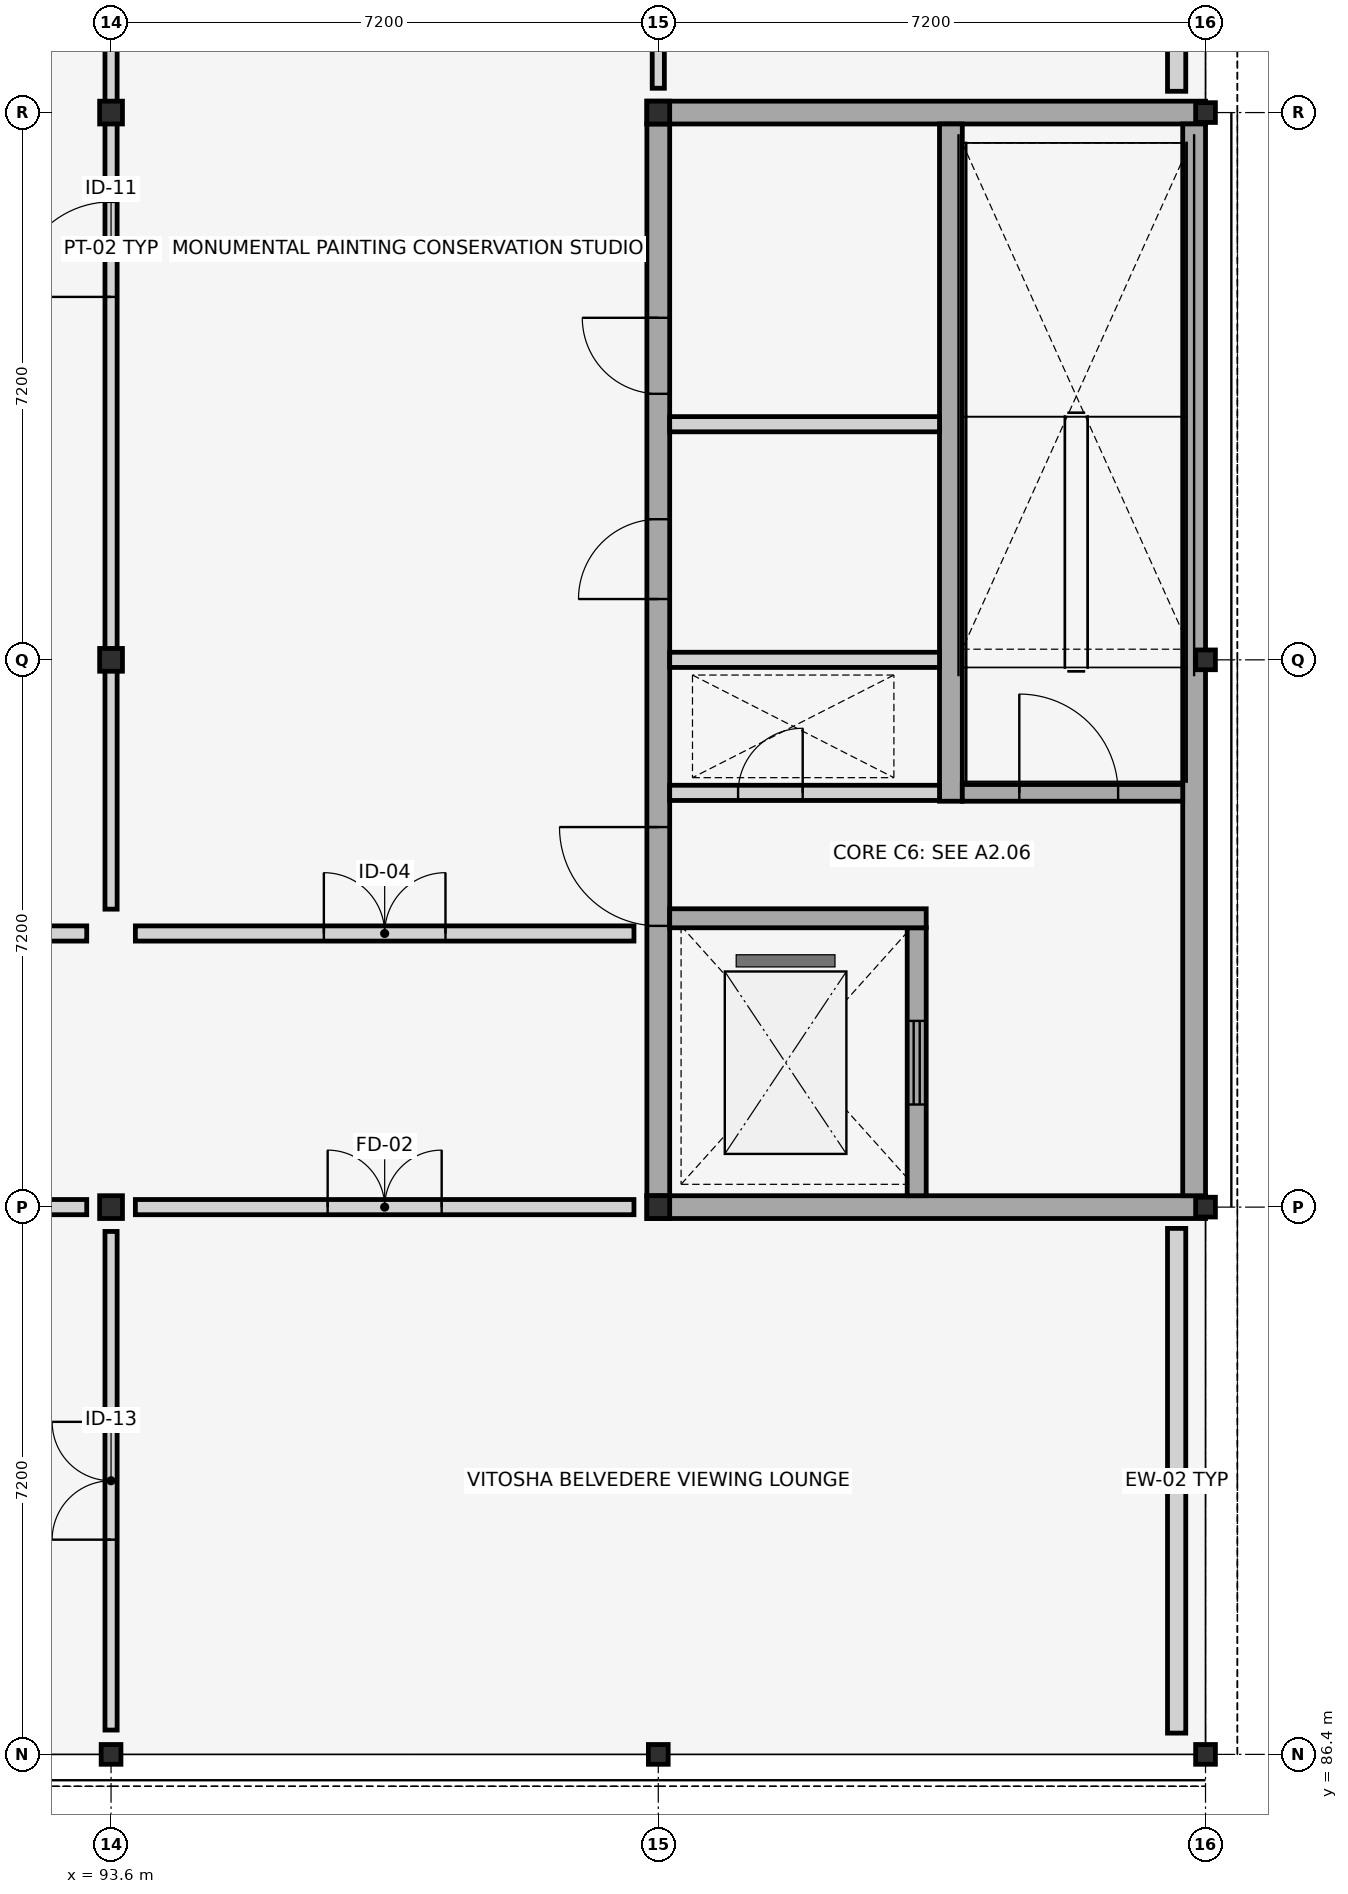
"""IFC4 building model, lengths in metres.
Left out: names, types, materials, properties, quantities, classifications, styles, units other than length and angle.
Written with IfcOpenShell. Run it as: python <this file> out.ifc"""

import sys

from ifc_helpers import new_model, si_unit, direction, frame, frame_2d, origin, origin_2d, place, context, subcontext, project, spatial, rectangle, i_section, extrude, element, fill, save


model = new_model("IFC4")
c1 = context("Model", 3, precision=1e-05, world=origin(), true_north=direction((0.0, 1.0)))
c2 = subcontext(c1, "Body", "Model", "MODEL_VIEW")
j1 = project(units=[si_unit("LENGTHUNIT", "METRE"), si_unit("PLANEANGLEUNIT", "RADIAN")], contexts=[c1])
p1 = place(None, origin())
s1 = spatial("IfcSite", under=j1, at=p1, CompositionType="ELEMENT")
p2 = place(p1, origin())
s2 = spatial("IfcBuilding", under=s1, at=p2, CompositionType="ELEMENT")
p3 = place(p2, frame((0.0, 0.0, 17.1)))
s3 = spatial("IfcBuildingStorey", under=s2, at=p3, CompositionType="ELEMENT", Elevation=17.1)
p4 = place(p3, frame((93.6, 86.4, 0.0), z_axis=(0.0, 0.0, 1.0), x_axis=(0.0, 1.0, 0.0)))
e1 = element("IfcColumn", 1, at=p4, inside=s3, PredefinedType="COLUMN", context=c2, shape_type="SweptSolid", body=[
    extrude(i_section(OverallWidth=0.26, OverallDepth=0.26, WebThickness=0.01, FlangeThickness=0.018, FilletRadius=0.024, at=origin_2d()), origin(), (0.0, 0.0, 1.0), 8.1),
])
for number, where, z_axis, x_axis in (
    (2, (93.6, 93.6, 0.0), (0.0, 0.0, 1.0), (1.0, 0.0, 0.0)),
    (3, (93.6, 100.8, 0.0), (0.0, 0.0, 1.0), (0.0, 1.0, 0.0)),
    (4, (93.6, 108.0, 0.0), (0.0, 0.0, 1.0), (1.0, 0.0, 0.0)),
):
    element("IfcColumn", number, at=place(p3, frame(where, z_axis=z_axis, x_axis=x_axis)), inside=s3, PredefinedType="COLUMN", context=c2, shape_type="SweptSolid", body=[
        extrude(i_section(OverallWidth=0.3, OverallDepth=0.3, WebThickness=0.011, FlangeThickness=0.019, FilletRadius=0.027, at=origin_2d()), origin(), (0.0, 0.0, 1.0), 8.1),
    ])
p5 = place(p3, frame((100.8, 86.4, 0.0), z_axis=(0.0, 0.0, 1.0), x_axis=(1.0, 0.0, 0.0)))
e5 = element("IfcColumn", 5, at=p5, inside=s3, PredefinedType="COLUMN", context=c2, shape_type="SweptSolid", body=[
    extrude(i_section(OverallWidth=0.26, OverallDepth=0.26, WebThickness=0.01, FlangeThickness=0.018, FilletRadius=0.024, at=origin_2d()), origin(), (0.0, 0.0, 1.0), 8.1),
])
for number, where, z_axis, x_axis in (
    (6, (100.8, 93.6, 0.0), (0.0, 0.0, 1.0), (0.0, 1.0, 0.0)),
    (7, (100.8, 108.0, 0.0), (0.0, 0.0, 1.0), (0.0, 1.0, 0.0)),
):
    element("IfcColumn", number, at=place(p3, frame(where, z_axis=z_axis, x_axis=x_axis)), inside=s3, PredefinedType="COLUMN", context=c2, shape_type="SweptSolid", body=[
        extrude(i_section(OverallWidth=0.3, OverallDepth=0.3, WebThickness=0.011, FlangeThickness=0.019, FilletRadius=0.027, at=origin_2d()), origin(), (0.0, 0.0, 1.0), 8.1),
    ])
for number, where, z_axis, x_axis in (
    (8, (108.0, 86.4, 0.0), (0.0, 0.0, 1.0), (0.0, 1.0, 0.0)),
    (9, (108.0, 93.6, 0.0), (0.0, 0.0, 1.0), (1.0, 0.0, 0.0)),
    (10, (108.0, 100.8, 0.0), (0.0, 0.0, 1.0), (0.0, 1.0, 0.0)),
    (11, (108.0, 108.0, 0.0), (0.0, 0.0, 1.0), (1.0, 0.0, 0.0)),
):
    element("IfcColumn", number, at=place(p3, frame(where, z_axis=z_axis, x_axis=x_axis)), inside=s3, PredefinedType="COLUMN", context=c2, shape_type="SweptSolid", body=[
        extrude(i_section(OverallWidth=0.26, OverallDepth=0.26, WebThickness=0.01, FlangeThickness=0.018, FilletRadius=0.024, at=origin_2d()), origin(), (0.0, 0.0, 1.0), 8.1),
    ])
p6 = place(p3, frame((107.62, 86.68, 0.0), z_axis=(0.0, 0.0, 1.0), x_axis=(0.0, 1.0, 0.0)))
e12 = element("IfcWall", 12, at=p6, inside=s3, PredefinedType="STANDARD", context=c2, shape_type="SweptSolid", body=[
    extrude(rectangle(XDim=6.64, YDim=0.24, at=frame_2d((3.32, 0.0))), origin(), (0.0, 0.0, 1.0), 7.48),
])
p7 = place(p3, frame((107.62, 108.28, 0.0), z_axis=(0.0, 0.0, 1.0), x_axis=(0.0, 1.0, 0.0)))
e13 = element("IfcWall", 13, at=p7, inside=s3, PredefinedType="STANDARD", context=c2, shape_type="SweptSolid", body=[
    extrude(rectangle(XDim=6.64, YDim=0.24, at=frame_2d((3.32, 0.0))), origin(), (0.0, 0.0, 1.0), 7.48),
])
for number, where, z_axis, x_axis in (
    (14, (100.65, 93.6, 0.0), (0.0, 0.0, 1.0), (1.0, 0.0, 0.0)),
    (15, (100.65, 108.0, 0.0), (0.0, 0.0, 1.0), (1.0, 0.0, 0.0)),
):
    element("IfcWall", number, at=place(p3, frame(where, z_axis=z_axis, x_axis=x_axis)), inside=s3, PredefinedType="SHEAR", context=c2, shape_type="SweptSolid", body=[
        extrude(rectangle(XDim=7.35, YDim=0.3, at=frame_2d((3.675, 0.0))), origin(), (0.0, 0.0, 1.0), 7.88),
    ])
p8 = place(p3, frame((107.85, 93.75, 0.0), z_axis=(0.0, 0.0, 1.0), x_axis=(0.0, 1.0, 0.0)))
e16 = element("IfcWall", 16, at=p8, inside=s3, PredefinedType="SHEAR", context=c2, shape_type="SweptSolid", body=[
    extrude(rectangle(XDim=14.1, YDim=0.3, at=frame_2d((7.05, 0.0))), origin(), (0.0, 0.0, 1.0), 7.88),
])
p9 = place(p3, frame((100.8, 93.75, 0.0), z_axis=(0.0, 0.0, 1.0), x_axis=(0.0, 1.0, 0.0)))
e17 = element("IfcWall", 17, at=p9, inside=s3, PredefinedType="SHEAR", context=c2, shape_type="SweptSolid", body=[
    extrude(rectangle(XDim=14.1, YDim=0.3, at=frame_2d((7.05, 0.0))), origin(), (0.0, 0.0, 1.0), 7.88),
])
p10 = place(p9, frame((3.55, 0.0, 0.0)))
e18 = element("IfcOpeningElement", 18, at=p10, cuts=e17, PredefinedType="OPENING", context=c2, shape_type="SweptSolid", body=[
    extrude(rectangle(XDim=1.3, YDim=2.2, at=frame_2d((0.65, 1.1))), frame((0.0, 0.16, 0.0), z_axis=(0.0, -1.0, 0.0), x_axis=(1.0, 0.0, 0.0)), (0.0, 0.0, 1.0), 0.32),
])
p11 = place(p9, frame((7.85, 0.0, 0.0)))
e19 = element("IfcOpeningElement", 19, at=p11, cuts=e17, PredefinedType="OPENING", context=c2, shape_type="SweptSolid", body=[
    extrude(rectangle(XDim=1.05, YDim=2.15, at=frame_2d((0.525, 1.075))), frame((0.0, 0.16, 0.0), z_axis=(0.0, -1.0, 0.0), x_axis=(1.0, 0.0, 0.0)), (0.0, 0.0, 1.0), 0.32),
])
p12 = place(p9, frame((10.55, 0.0, 0.0)))
e20 = element("IfcOpeningElement", 20, at=p12, cuts=e17, PredefinedType="OPENING", context=c2, shape_type="SweptSolid", body=[
    extrude(rectangle(XDim=1.0, YDim=2.15, at=frame_2d((0.5, 1.075))), frame((0.0, 0.16, 0.0), z_axis=(0.0, -1.0, 0.0), x_axis=(1.0, 0.0, 0.0)), (0.0, 0.0, 1.0), 0.32),
])
p13 = place(p3, frame((104.2, 93.75, 0.0), z_axis=(0.0, 0.0, 1.0), x_axis=(0.0, 1.0, 0.0)))
e21 = element("IfcWall", 21, at=p13, inside=s3, PredefinedType="SHEAR", context=c2, shape_type="SweptSolid", body=[
    extrude(rectangle(XDim=3.525, YDim=0.25, at=frame_2d((1.762, 0.0))), origin(), (0.0, 0.0, 1.0), 7.88),
])
p14 = place(p13, frame((1.2, 0.0, 0.0)))
e22 = element("IfcOpeningElement", 22, at=p14, cuts=e21, PredefinedType="OPENING", context=c2, shape_type="SweptSolid", body=[
    extrude(rectangle(XDim=1.1, YDim=2.15, at=frame_2d((0.55, 1.075))), frame((0.0, 0.135, 0.0), z_axis=(0.0, -1.0, 0.0), x_axis=(1.0, 0.0, 0.0)), (0.0, 0.0, 1.0), 0.27),
])
p15 = place(p3, frame((104.65, 98.94, 0.0), z_axis=(0.0, 0.0, 1.0), x_axis=(0.0, 1.0, 0.0)))
e23 = element("IfcWall", 23, at=p15, inside=s3, PredefinedType="SHEAR", context=c2, shape_type="SweptSolid", body=[
    extrude(rectangle(XDim=8.91, YDim=0.3, at=frame_2d((4.455, 0.0))), origin(), (0.0, 0.0, 1.0), 7.88),
])
p16 = place(p3, frame((100.95, 99.05, 0.0), z_axis=(0.0, 0.0, 1.0), x_axis=(1.0, 0.0, 0.0)))
e24 = element("IfcWall", 24, at=p16, inside=s3, PredefinedType="PLUMBINGWALL", context=c2, shape_type="SweptSolid", body=[
    extrude(rectangle(XDim=3.55, YDim=0.2, at=frame_2d((1.775, 0.0))), origin(), (0.0, 0.0, 1.0), 7.3),
])
p17 = place(p16, frame((0.9, 0.0, 0.0)))
e25 = element("IfcOpeningElement", 25, at=p17, cuts=e24, PredefinedType="OPENING", context=c2, shape_type="SweptSolid", body=[
    extrude(rectangle(XDim=0.85, YDim=2.05, at=frame_2d((0.425, 1.025))), frame((0.0, 0.11, 0.0), z_axis=(0.0, -1.0, 0.0), x_axis=(1.0, 0.0, 0.0)), (0.0, 0.0, 1.0), 0.22),
])
p18 = place(p3, frame((104.8, 99.05, 0.0), z_axis=(0.0, 0.0, 1.0), x_axis=(1.0, 0.0, 0.0)))
e26 = element("IfcWall", 26, at=p18, inside=s3, PredefinedType="SHEAR", context=c2, shape_type="SweptSolid", body=[
    extrude(rectangle(XDim=2.9, YDim=0.22, at=frame_2d((1.45, 0.0))), origin(), (0.0, 0.0, 1.0), 7.88),
])
p19 = place(p18, frame((0.75, 0.0, 0.0)))
e27 = element("IfcOpeningElement", 27, at=p19, cuts=e26, PredefinedType="OPENING", context=c2, shape_type="SweptSolid", body=[
    extrude(rectangle(XDim=1.3, YDim=2.2, at=frame_2d((0.65, 1.1))), frame((0.0, 0.12, 0.0), z_axis=(0.0, -1.0, 0.0), x_axis=(1.0, 0.0, 0.0)), (0.0, 0.0, 1.0), 0.24),
])
p20 = place(p3, frame((100.95, 97.4, 0.0), z_axis=(0.0, 0.0, 1.0), x_axis=(1.0, 0.0, 0.0)))
e28 = element("IfcWall", 28, at=p20, inside=s3, PredefinedType="SHEAR", context=c2, shape_type="SweptSolid", body=[
    extrude(rectangle(XDim=3.375, YDim=0.25, at=frame_2d((1.688, 0.0))), origin(), (0.0, 0.0, 1.0), 7.88),
])
for number, where, z_axis, x_axis in (
    (29, (100.95, 100.8, 0.0), (0.0, 0.0, 1.0), (1.0, 0.0, 0.0)),
    (30, (100.95, 103.9, 0.0), (0.0, 0.0, 1.0), (1.0, 0.0, 0.0)),
):
    element("IfcWall", number, at=place(p3, frame(where, z_axis=z_axis, x_axis=x_axis)), inside=s3, PredefinedType="PLUMBINGWALL", context=c2, shape_type="SweptSolid", body=[
        extrude(rectangle(XDim=3.55, YDim=0.2, at=frame_2d((1.775, 0.0))), origin(), (0.0, 0.0, 1.0), 7.3),
    ])
p21 = place(p3, frame((65.12, 97.2, 0.0), z_axis=(0.0, 0.0, 1.0), x_axis=(1.0, 0.0, 0.0)))
e31 = element("IfcWall", 31, at=p21, inside=s3, PredefinedType="PARTITIONING", context=c2, shape_type="SweptSolid", body=[
    extrude(rectangle(XDim=28.16, YDim=0.2, at=frame_2d((14.08, 0.0))), origin(), (0.0, 0.0, 1.0), 7.05),
])
p22 = place(p21, frame((1.649, 0.0, 0.0)))
e32 = element("IfcOpeningElement", 32, at=p22, cuts=e31, PredefinedType="OPENING", context=c2, shape_type="SweptSolid", body=[
    extrude(rectangle(XDim=1.6, YDim=2.35, at=frame_2d((0.8, 1.175))), frame((0.0, 0.11, 0.0), z_axis=(0.0, -1.0, 0.0), x_axis=(1.0, 0.0, 0.0)), (0.0, 0.0, 1.0), 0.22),
])
p23 = place(p3, frame((65.12, 93.6, 0.0), z_axis=(0.0, 0.0, 1.0), x_axis=(1.0, 0.0, 0.0)))
e33 = element("IfcWall", 33, at=p23, inside=s3, PredefinedType="PARTITIONING", context=c2, shape_type="SweptSolid", body=[
    extrude(rectangle(XDim=28.16, YDim=0.2, at=frame_2d((14.08, 0.0))), origin(), (0.0, 0.0, 1.0), 7.05),
])
p24 = place(p23, frame((1.649, 0.0, 0.0)))
e34 = element("IfcOpeningElement", 34, at=p24, cuts=e33, PredefinedType="OPENING", context=c2, shape_type="SweptSolid", body=[
    extrude(rectangle(XDim=1.6, YDim=2.35, at=frame_2d((0.8, 1.175))), frame((0.0, 0.11, 0.0), z_axis=(0.0, -1.0, 0.0), x_axis=(1.0, 0.0, 0.0)), (0.0, 0.0, 1.0), 0.22),
])
p25 = place(p3, frame((93.92, 93.6, 0.0), z_axis=(0.0, 0.0, 1.0), x_axis=(1.0, 0.0, 0.0)))
e35 = element("IfcWall", 35, at=p25, inside=s3, PredefinedType="PARTITIONING", context=c2, shape_type="SweptSolid", body=[
    extrude(rectangle(XDim=6.56, YDim=0.2, at=frame_2d((3.28, 0.0))), origin(), (0.0, 0.0, 1.0), 7.05),
])
p26 = place(p25, frame((2.53, 0.0, 0.0)))
e36 = element("IfcOpeningElement", 36, at=p26, cuts=e35, PredefinedType="OPENING", context=c2, shape_type="SweptSolid", body=[
    extrude(rectangle(XDim=1.5, YDim=2.25, at=frame_2d((0.75, 1.125))), frame((0.0, 0.11, 0.0), z_axis=(0.0, -1.0, 0.0), x_axis=(1.0, 0.0, 0.0)), (0.0, 0.0, 1.0), 0.22),
])
p27 = place(p3, frame((93.92, 97.2, 0.0), z_axis=(0.0, 0.0, 1.0), x_axis=(1.0, 0.0, 0.0)))
e37 = element("IfcWall", 37, at=p27, inside=s3, PredefinedType="PARTITIONING", context=c2, shape_type="SweptSolid", body=[
    extrude(rectangle(XDim=6.56, YDim=0.2, at=frame_2d((3.28, 0.0))), origin(), (0.0, 0.0, 1.0), 7.05),
])
p28 = place(p27, frame((2.48, 0.0, 0.0)))
e38 = element("IfcOpeningElement", 38, at=p28, cuts=e37, PredefinedType="OPENING", context=c2, shape_type="SweptSolid", body=[
    extrude(rectangle(XDim=1.6, YDim=2.35, at=frame_2d((0.8, 1.175))), frame((0.0, 0.11, 0.0), z_axis=(0.0, -1.0, 0.0), x_axis=(1.0, 0.0, 0.0)), (0.0, 0.0, 1.0), 0.22),
])
p29 = place(p3, frame((93.6, 97.52, 0.0), z_axis=(0.0, 0.0, 1.0), x_axis=(0.0, 1.0, 0.0)))
e39 = element("IfcWall", 39, at=p29, inside=s3, PredefinedType="PARTITIONING", context=c2, shape_type="SweptSolid", body=[
    extrude(rectangle(XDim=17.36, YDim=0.16, at=frame_2d((8.68, 0.0))), origin(), (0.0, 0.0, 1.0), 7.05),
])
p30 = place(p29, frame((8.055, 0.0, 0.0)))
e40 = element("IfcOpeningElement", 40, at=p30, cuts=e39, PredefinedType="OPENING", context=c2, shape_type="SweptSolid", body=[
    extrude(rectangle(XDim=1.25, YDim=2.3, at=frame_2d((0.625, 1.15))), frame((0.0, 0.09, 0.0), z_axis=(0.0, -1.0, 0.0), x_axis=(1.0, 0.0, 0.0)), (0.0, 0.0, 1.0), 0.18),
])
p31 = place(p3, frame((93.6, 86.72, 0.0), z_axis=(0.0, 0.0, 1.0), x_axis=(0.0, 1.0, 0.0)))
e41 = element("IfcWall", 41, at=p31, inside=s3, PredefinedType="PARTITIONING", context=c2, shape_type="SweptSolid", body=[
    extrude(rectangle(XDim=6.56, YDim=0.16, at=frame_2d((3.28, 0.0))), origin(), (0.0, 0.0, 1.0), 7.05),
])
p32 = place(p31, frame((2.505, 0.0, 0.0)))
e42 = element("IfcOpeningElement", 42, at=p32, cuts=e41, PredefinedType="OPENING", context=c2, shape_type="SweptSolid", body=[
    extrude(rectangle(XDim=1.55, YDim=2.4, at=frame_2d((0.775, 1.2))), frame((0.0, 0.09, 0.0), z_axis=(0.0, -1.0, 0.0), x_axis=(1.0, 0.0, 0.0)), (0.0, 0.0, 1.0), 0.18),
])
p33 = place(p3, frame((100.8, 108.32, 0.0), z_axis=(0.0, 0.0, 1.0), x_axis=(0.0, 1.0, 0.0)))
e43 = element("IfcWall", 43, at=p33, inside=s3, PredefinedType="PARTITIONING", context=c2, shape_type="SweptSolid", body=[
    extrude(rectangle(XDim=6.56, YDim=0.16, at=frame_2d((3.28, 0.0))), origin(), (0.0, 0.0, 1.0), 7.05),
])
p34 = place(p33, frame((2.355, 0.0, 0.0)))
e44 = element("IfcOpeningElement", 44, at=p34, cuts=e43, PredefinedType="OPENING", context=c2, shape_type="SweptSolid", body=[
    extrude(rectangle(XDim=1.85, YDim=2.5, at=frame_2d((0.925, 1.25))), frame((0.0, 0.09, 0.0), z_axis=(0.0, -1.0, 0.0), x_axis=(1.0, 0.0, 0.0)), (0.0, 0.0, 1.0), 0.18),
])
p35 = place(p10, origin())
e45 = element("IfcDoor", 45, at=p35, inside=s3, OperationType="SINGLE_SWING_RIGHT", PredefinedType="DOOR", context=c2, shape_type="SweptSolid", body=[
    extrude(rectangle(XDim=1.3, YDim=2.2, at=frame_2d((0.65, 1.1))), frame((0.0, 0.025, 0.0), z_axis=(0.0, -1.0, 0.0), x_axis=(1.0, 0.0, 0.0)), (0.0, 0.0, 1.0), 0.05),
])
fill(e18, e45)
p36 = place(p11, origin())
e46 = element("IfcDoor", 46, at=p36, inside=s3, OperationType="SINGLE_SWING_LEFT", PredefinedType="DOOR", context=c2, shape_type="SweptSolid", body=[
    extrude(rectangle(XDim=1.05, YDim=2.15, at=frame_2d((0.525, 1.075))), frame((0.0, 0.025, 0.0), z_axis=(0.0, -1.0, 0.0), x_axis=(1.0, 0.0, 0.0)), (0.0, 0.0, 1.0), 0.05),
])
fill(e19, e46)
p37 = place(p12, origin())
e47 = element("IfcDoor", 47, at=p37, inside=s3, OperationType="SINGLE_SWING_RIGHT", PredefinedType="DOOR", context=c2, shape_type="SweptSolid", body=[
    extrude(rectangle(XDim=1.0, YDim=2.15, at=frame_2d((0.5, 1.075))), frame((0.0, 0.025, 0.0), z_axis=(0.0, -1.0, 0.0), x_axis=(1.0, 0.0, 0.0)), (0.0, 0.0, 1.0), 0.05),
])
fill(e20, e47)
p38 = place(p14, origin())
e48 = element("IfcDoor", 48, at=p38, inside=s3, OperationType="SLIDING_TO_LEFT", PredefinedType="DOOR", context=c2, shape_type="SweptSolid", body=[
    extrude(rectangle(XDim=1.1, YDim=2.15, at=frame_2d((0.55, 1.075))), frame((0.0, 0.025, 0.0), z_axis=(0.0, -1.0, 0.0), x_axis=(1.0, 0.0, 0.0)), (0.0, 0.0, 1.0), 0.05),
])
fill(e22, e48)
p39 = place(p17, origin())
e49 = element("IfcDoor", 49, at=p39, inside=s3, OperationType="SINGLE_SWING_RIGHT", PredefinedType="TRAPDOOR", context=c2, shape_type="SweptSolid", body=[
    extrude(rectangle(XDim=0.85, YDim=2.05, at=frame_2d((0.425, 1.025))), frame((0.0, 0.025, 0.0), z_axis=(0.0, -1.0, 0.0), x_axis=(1.0, 0.0, 0.0)), (0.0, 0.0, 1.0), 0.05),
])
fill(e25, e49)
p40 = place(p19, origin())
e50 = element("IfcDoor", 50, at=p40, inside=s3, OperationType="SINGLE_SWING_LEFT", PredefinedType="DOOR", context=c2, shape_type="SweptSolid", body=[
    extrude(rectangle(XDim=1.3, YDim=2.2, at=frame_2d((0.65, 1.1))), frame((0.0, 0.025, 0.0), z_axis=(0.0, -1.0, 0.0), x_axis=(1.0, 0.0, 0.0)), (0.0, 0.0, 1.0), 0.05),
])
fill(e27, e50)
p41 = place(p26, origin())
e51 = element("IfcDoor", 51, at=p41, inside=s3, OperationType="DOUBLE_DOOR_SINGLE_SWING", PredefinedType="DOOR", context=c2, shape_type="SweptSolid", body=[
    extrude(rectangle(XDim=1.5, YDim=2.25, at=frame_2d((0.75, 1.125))), frame((0.0, 0.025, 0.0), z_axis=(0.0, -1.0, 0.0), x_axis=(1.0, 0.0, 0.0)), (0.0, 0.0, 1.0), 0.05),
])
fill(e36, e51)
p42 = place(p28, origin())
e52 = element("IfcDoor", 52, at=p42, inside=s3, OperationType="DOUBLE_DOOR_SINGLE_SWING", PredefinedType="DOOR", context=c2, shape_type="SweptSolid", body=[
    extrude(rectangle(XDim=1.6, YDim=2.35, at=frame_2d((0.8, 1.175))), frame((0.0, 0.025, 0.0), z_axis=(0.0, -1.0, 0.0), x_axis=(1.0, 0.0, 0.0)), (0.0, 0.0, 1.0), 0.05),
])
fill(e38, e52)
p43 = place(p30, origin())
e53 = element("IfcDoor", 53, at=p43, inside=s3, OperationType="SINGLE_SWING_LEFT", PredefinedType="DOOR", context=c2, shape_type="SweptSolid", body=[
    extrude(rectangle(XDim=1.25, YDim=2.3, at=frame_2d((0.625, 1.15))), frame((0.0, 0.025, 0.0), z_axis=(0.0, -1.0, 0.0), x_axis=(1.0, 0.0, 0.0)), (0.0, 0.0, 1.0), 0.05),
])
fill(e40, e53)
p44 = place(p32, origin())
e54 = element("IfcDoor", 54, at=p44, inside=s3, OperationType="DOUBLE_DOOR_SINGLE_SWING", PredefinedType="DOOR", context=c2, shape_type="SweptSolid", body=[
    extrude(rectangle(XDim=1.55, YDim=2.4, at=frame_2d((0.775, 1.2))), frame((0.0, 0.025, 0.0), z_axis=(0.0, -1.0, 0.0), x_axis=(1.0, 0.0, 0.0)), (0.0, 0.0, 1.0), 0.05),
])
fill(e42, e54)
save(model, sys.argv[1])
